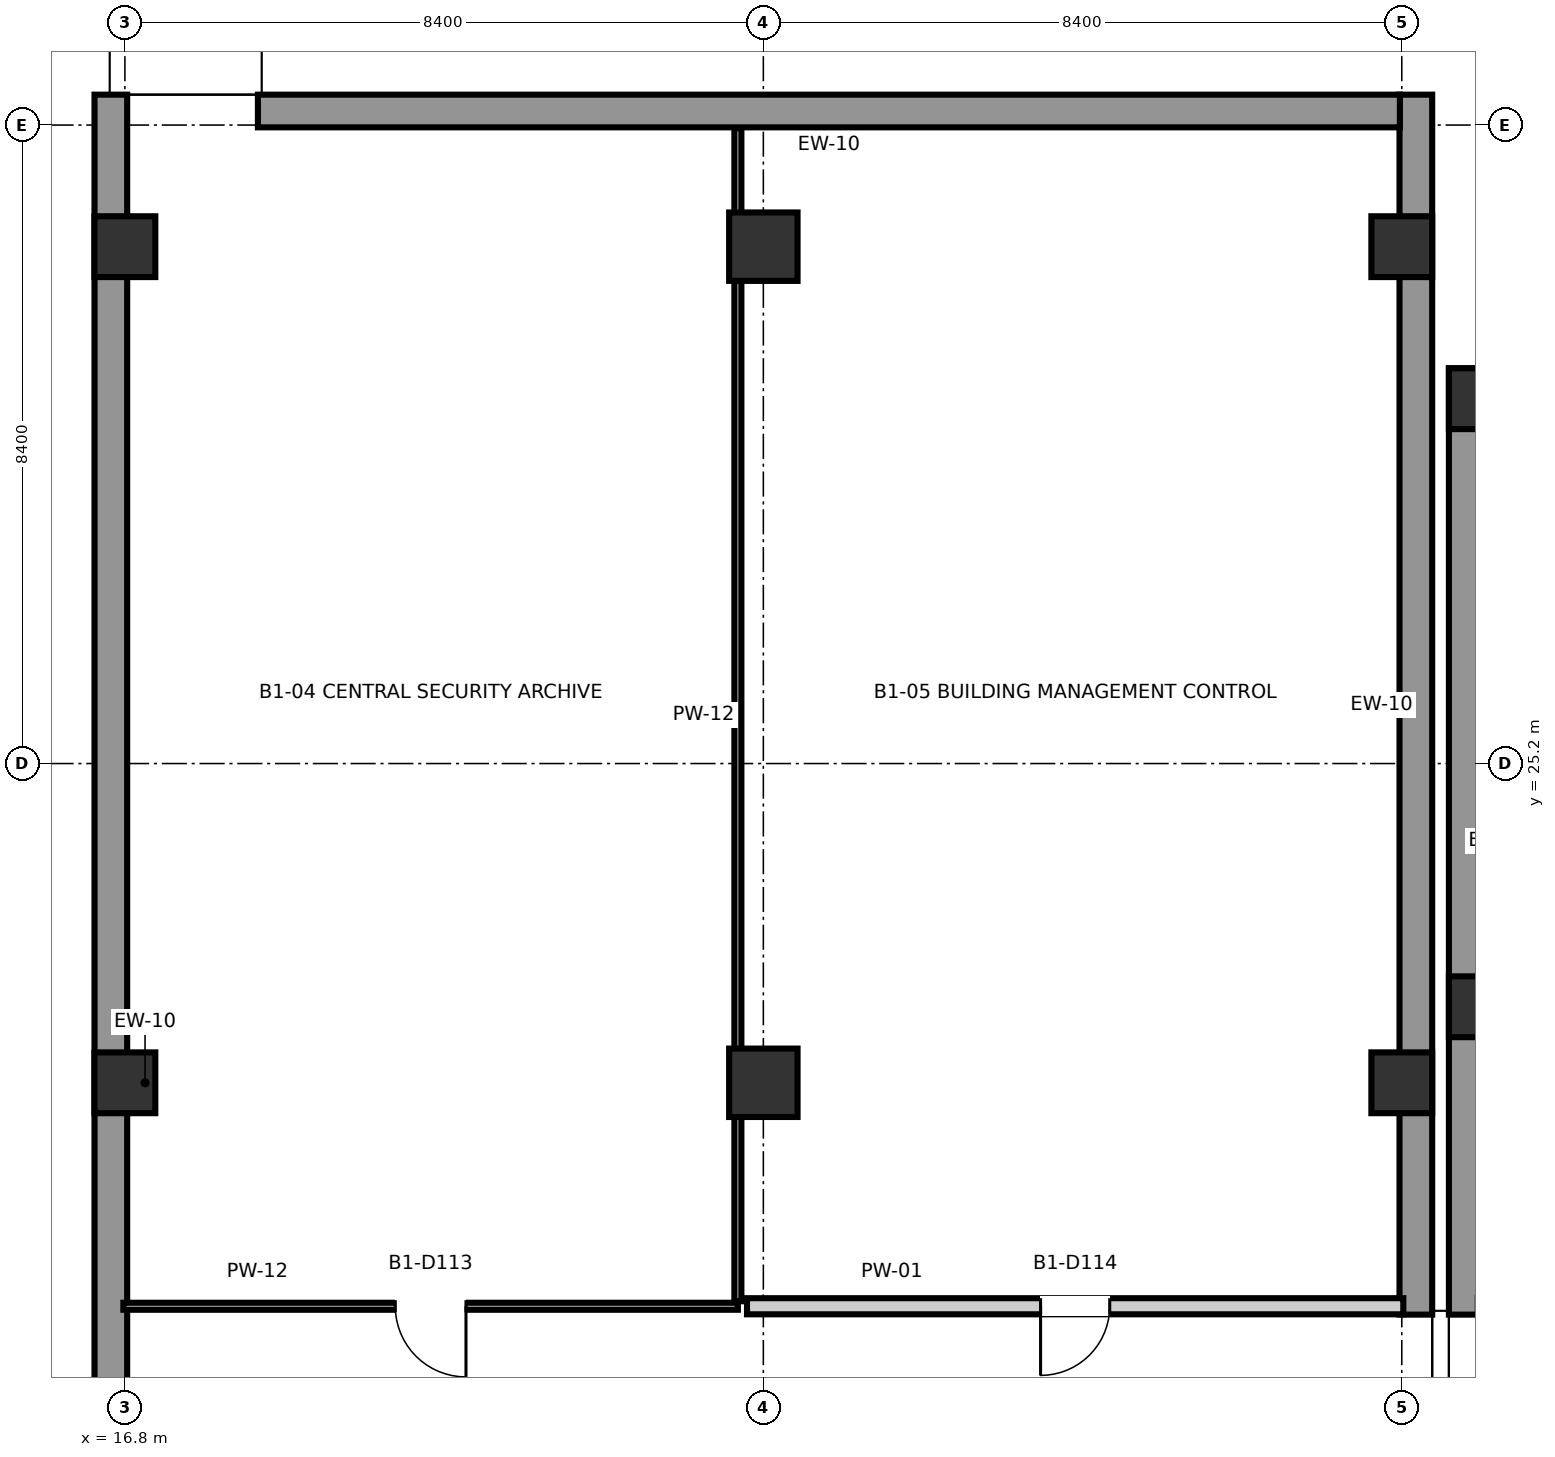
"""IFC4 building model, lengths in metres.
Left out: names, types, materials, properties, quantities, classifications, styles, units other than length and angle.
Written with IfcOpenShell. Run it as: python <this file> out.ifc"""

import sys

from ifc_helpers import new_model, si_unit, direction, frame, frame_2d, origin, origin_2d, place, context, subcontext, project, spatial, rectangle, extrude, element, fill, save


model = new_model("IFC4")
c1 = context("Model", 3, precision=1e-05, world=origin(), true_north=direction((0.0, 1.0)))
c2 = subcontext(c1, "Body", "Model", "MODEL_VIEW")
j1 = project(units=[si_unit("LENGTHUNIT", "METRE"), si_unit("PLANEANGLEUNIT", "RADIAN")], contexts=[c1])
p1 = place(None, origin())
s1 = spatial("IfcSite", under=j1, at=p1, CompositionType="ELEMENT")
p2 = place(p1, origin())
s2 = spatial("IfcBuilding", under=s1, at=p2, CompositionType="ELEMENT")
p3 = place(p2, frame((0.0, 0.0, -4.2)))
s3 = spatial("IfcBuildingStorey", under=s2, at=p3, CompositionType="ELEMENT", Elevation=-4.2)
for number, where, z_axis, x_axis in (
    (1, (16.8, 21.0, 0.0), (0.0, 0.0, 1.0), (1.0, 0.0, 0.0)),
    (2, (16.8, 32.0, 0.0), (0.0, 0.0, 1.0), (1.0, 0.0, 0.0)),
):
    element("IfcColumn", number, at=place(p3, frame(where, z_axis=z_axis, x_axis=x_axis)), inside=s3, PredefinedType="COLUMN", context=c2, shape_type="SweptSolid", body=[
        extrude(rectangle(XDim=0.8, YDim=0.8, at=origin_2d()), origin(), (0.0, 0.0, 1.0), 4.2),
    ])
for number, where, z_axis, x_axis in (
    (3, (25.2, 21.0, 0.0), (0.0, 0.0, 1.0), (1.0, 0.0, 0.0)),
    (4, (25.2, 32.0, 0.0), (0.0, 0.0, 1.0), (1.0, 0.0, 0.0)),
):
    element("IfcColumn", number, at=place(p3, frame(where, z_axis=z_axis, x_axis=x_axis)), inside=s3, PredefinedType="COLUMN", context=c2, shape_type="SweptSolid", body=[
        extrude(rectangle(XDim=0.9, YDim=0.9, at=origin_2d()), origin(), (0.0, 0.0, 1.0), 4.2),
    ])
for number, where, z_axis, x_axis in (
    (5, (33.6, 21.0, 0.0), (0.0, 0.0, 1.0), (1.0, 0.0, 0.0)),
    (6, (33.6, 32.0, 0.0), (0.0, 0.0, 1.0), (1.0, 0.0, 0.0)),
    (7, (34.62, 22.0, 0.0), (0.0, 0.0, 1.0), (1.0, 0.0, 0.0)),
    (8, (34.62, 30.0, 0.0), (0.0, 0.0, 1.0), (1.0, 0.0, 0.0)),
):
    element("IfcColumn", number, at=place(p3, frame(where, z_axis=z_axis, x_axis=x_axis)), inside=s3, PredefinedType="COLUMN", context=c2, shape_type="SweptSolid", body=[
        extrude(rectangle(XDim=0.8, YDim=0.8, at=origin_2d()), origin(), (0.0, 0.0, 1.0), 4.2),
    ])
p4 = place(p3, frame((33.785, 17.95, 0.0), z_axis=(0.0, 0.0, 1.0), x_axis=(0.0, 1.0, 0.0)))
e9 = element("IfcWall", 9, at=p4, inside=s3, PredefinedType="SOLIDWALL", context=c2, shape_type="SweptSolid", body=[
    extrude(rectangle(XDim=16.05, YDim=0.43, at=frame_2d((8.025, 0.0))), origin(), (0.0, 0.0, 1.0), 4.2),
])
p5 = place(p3, frame((33.575, 33.785, 0.0), z_axis=(0.0, 0.0, 1.0), x_axis=(-1.0, 0.0, 0.0)))
e10 = element("IfcWall", 10, at=p5, inside=s3, PredefinedType="SOLIDWALL", context=c2, shape_type="SweptSolid", body=[
    extrude(rectangle(XDim=15.025, YDim=0.43, at=frame_2d((7.512, 0.0))), origin(), (0.0, 0.0, 1.0), 4.2),
])
p6 = place(p3, frame((16.615, 34.0, 0.0), z_axis=(0.0, 0.0, 1.0), x_axis=(0.0, -1.0, 0.0)))
e11 = element("IfcWall", 11, at=p6, inside=s3, PredefinedType="SOLIDWALL", context=c2, shape_type="SweptSolid", body=[
    extrude(rectangle(XDim=26.0, YDim=0.43, at=frame_2d((13.0, 0.0))), origin(), (0.0, 0.0, 1.0), 4.2),
])
p7 = place(p3, frame((34.435, 30.4, 0.0), z_axis=(0.0, 0.0, 1.0), x_axis=(0.0, -1.0, 0.0)))
e12 = element("IfcWall", 12, at=p7, inside=s3, PredefinedType="SOLIDWALL", context=c2, shape_type="SweptSolid", body=[
    extrude(rectangle(XDim=12.45, YDim=0.43, at=frame_2d((6.225, 0.0))), origin(), (0.0, 0.0, 1.0), 4.2),
])
p8 = place(p3, frame((16.78, 18.06, 0.0), z_axis=(0.0, 0.0, 1.0), x_axis=(1.0, 0.0, 0.0)))
e13 = element("IfcWall", 13, at=p8, inside=s3, PredefinedType="PARTITIONING", context=c2, shape_type="SweptSolid", body=[
    extrude(rectangle(XDim=8.085, YDim=0.092, at=frame_2d((4.042, 0.0))), origin(), (0.0, 0.0, 1.0), 3.86),
])
p9 = place(p8, frame((3.577, 0.0, 0.0)))
e14 = element("IfcOpeningElement", 14, at=p9, cuts=e13, PredefinedType="OPENING", context=c2, shape_type="SweptSolid", body=[
    extrude(rectangle(XDim=0.93, YDim=2.08, at=frame_2d((0.465, 1.04))), frame((0.0, 0.061, 0.0), z_axis=(0.0, -1.0, 0.0), x_axis=(1.0, 0.0, 0.0)), (0.0, 0.0, 1.0), 0.122),
])
p10 = place(p3, frame((24.865, 18.126, 0.0), z_axis=(0.0, 0.0, 1.0), x_axis=(0.0, 1.0, 0.0)))
e15 = element("IfcWall", 15, at=p10, inside=s3, PredefinedType="PARTITIONING", context=c2, shape_type="SweptSolid", body=[
    extrude(rectangle(XDim=15.434, YDim=0.092, at=frame_2d((7.717, 0.0))), origin(), (0.0, 0.0, 1.0), 3.29),
])
p11 = place(p3, frame((24.985, 18.06, 0.0), z_axis=(0.0, 0.0, 1.0), x_axis=(1.0, 0.0, 0.0)))
e16 = element("IfcWall", 16, at=p11, inside=s3, PredefinedType="PARTITIONING", context=c2, shape_type="SweptSolid", body=[
    extrude(rectangle(XDim=8.635, YDim=0.212, at=frame_2d((4.317, 0.0))), origin(), (0.0, 0.0, 1.0), 3.86),
])
p12 = place(p11, frame((3.863, 0.0, 0.0)))
e17 = element("IfcOpeningElement", 17, at=p12, cuts=e16, PredefinedType="OPENING", context=c2, shape_type="SweptSolid", body=[
    extrude(rectangle(XDim=0.91, YDim=2.04, at=frame_2d((0.455, 1.02))), frame((0.0, 0.121, 0.0), z_axis=(0.0, -1.0, 0.0), x_axis=(1.0, 0.0, 0.0)), (0.0, 0.0, 1.0), 0.242),
])
p13 = place(p9, origin())
e18 = element("IfcDoor", 18, at=p13, inside=s3, OperationType="SINGLE_SWING_RIGHT", PredefinedType="DOOR", context=c2, shape_type="SweptSolid", body=[
    extrude(rectangle(XDim=0.93, YDim=2.08, at=frame_2d((0.465, 1.04))), frame((0.0, 0.025, 0.0), z_axis=(0.0, -1.0, 0.0), x_axis=(1.0, 0.0, 0.0)), (0.0, 0.0, 1.0), 0.05),
])
fill(e14, e18)
p14 = place(p12, origin())
e19 = element("IfcDoor", 19, at=p14, inside=s3, OperationType="SINGLE_SWING_LEFT", PredefinedType="DOOR", context=c2, shape_type="SweptSolid", body=[
    extrude(rectangle(XDim=0.91, YDim=2.04, at=frame_2d((0.455, 1.02))), frame((0.0, 0.025, 0.0), z_axis=(0.0, -1.0, 0.0), x_axis=(1.0, 0.0, 0.0)), (0.0, 0.0, 1.0), 0.05),
])
fill(e17, e19)
save(model, sys.argv[1])
